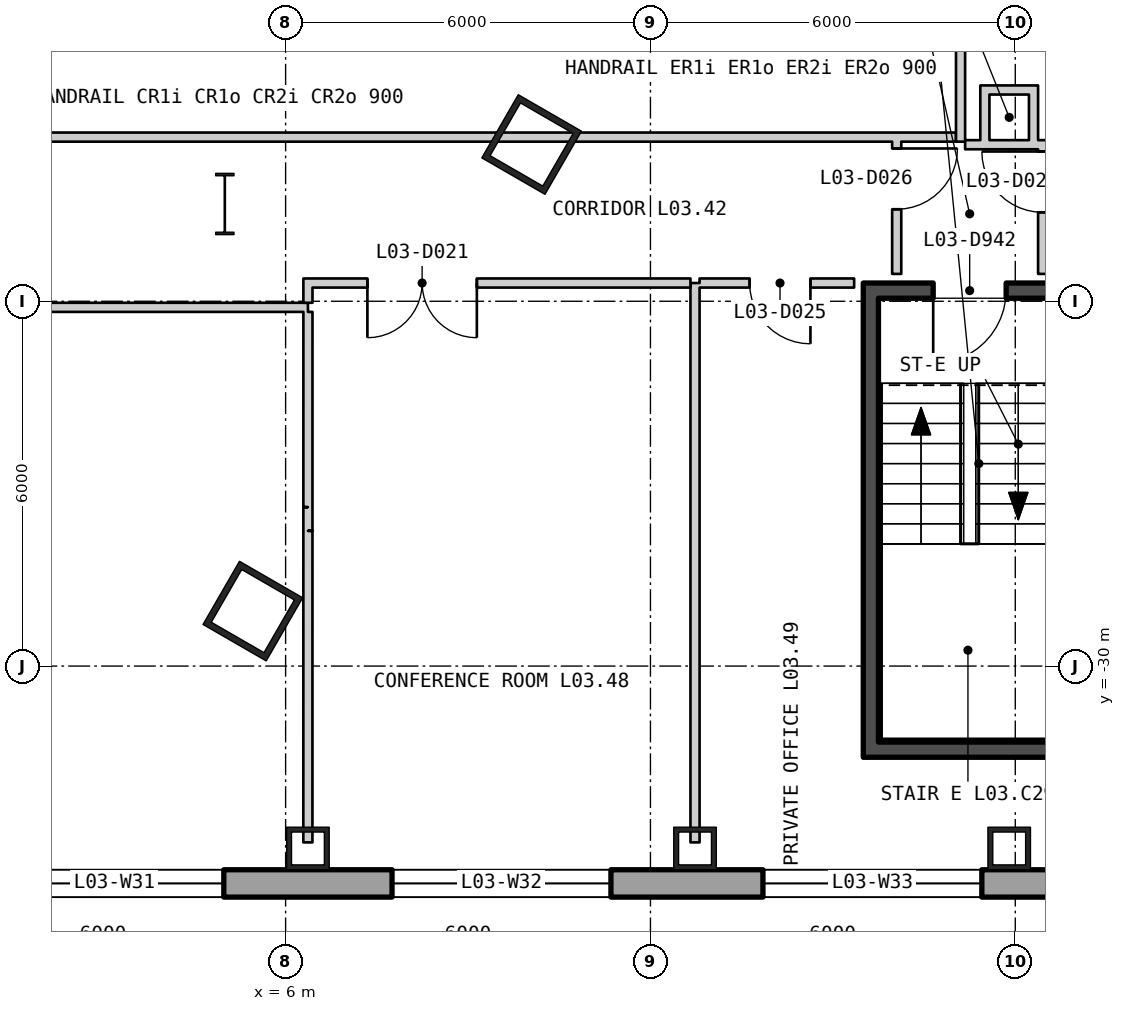
"""IFC4 building model, lengths in metres.
Left out: names, types, materials, properties, quantities, classifications, styles, units other than length and angle.
Written with IfcOpenShell. Run it as: python <this file> out.ifc"""

import sys

from ifc_helpers import new_model, si_unit, direction, frame, frame_2d, origin, origin_2d, place, context, subcontext, project, spatial, polyline, rectangle, hollow_rectangle, i_section, outline, extrude, element, fill, save


model = new_model("IFC4")
c1 = context("Model", 3, precision=1e-05, world=origin(), true_north=direction((0.0, 1.0)))
c2 = subcontext(c1, "Body", "Model", "MODEL_VIEW")
j1 = project(units=[si_unit("LENGTHUNIT", "METRE"), si_unit("PLANEANGLEUNIT", "RADIAN")], contexts=[c1])
p1 = place(None, origin())
s1 = spatial("IfcSite", under=j1, at=p1, CompositionType="ELEMENT")
p2 = place(p1, origin())
s2 = spatial("IfcBuilding", under=s1, at=p2, CompositionType="ELEMENT")
p3 = place(p2, frame((0.0, 0.0, 18.6)))
s3 = spatial("IfcBuildingStorey", under=s2, at=p3, CompositionType="ELEMENT", Elevation=18.6)
for number, where, z_axis, x_axis in (
    (1, (5.461, -29.096, 0.0), (0.0, 0.0, 1.0), (0.5, 0.866, 0.0)),
    (2, (10.046, -21.422, 0.0), (0.0, 0.0, 1.0), (0.5, 0.866, 0.0)),
):
    element("IfcColumn", number, at=place(p3, frame(where, z_axis=z_axis, x_axis=x_axis)), inside=s3, PredefinedType="COLUMN", context=c2, shape_type="SweptSolid", body=[
        extrude(hollow_rectangle(XDim=1.2, YDim=1.2, WallThickness=0.1, at=origin_2d()), origin(), (0.0, 0.0, 1.0), 5.1),
    ])
p4 = place(p3, frame((5.0, -22.4, 0.0), z_axis=(0.0, 0.0, 1.0), x_axis=(1.0, 0.0, 0.0)))
e3 = element("IfcColumn", 3, at=p4, inside=s3, PredefinedType="COLUMN", context=c2, shape_type="SweptSolid", body=[
    extrude(i_section(OverallWidth=0.302, OverallDepth=1.008, WebThickness=0.021, FlangeThickness=0.04, at=origin_2d()), origin(), (0.0, 0.0, 1.0), 5.1),
])
for number, where, z_axis, x_axis in (
    (4, (6.367, -33.0, 0.0), (0.0, 0.0, 1.0), (1.0, 0.0, 0.0)),
    (5, (12.733, -33.0, 0.0), (0.0, 0.0, 1.0), (1.0, 0.0, 0.0)),
    (6, (17.9, -33.0, 0.0), (0.0, 0.0, 1.0), (1.0, 0.0, 0.0)),
):
    element("IfcColumn", number, at=place(p3, frame(where, z_axis=z_axis, x_axis=x_axis)), inside=s3, PredefinedType="COLUMN", context=c2, shape_type="SweptSolid", body=[
        extrude(hollow_rectangle(XDim=0.7, YDim=0.7, WallThickness=0.08, at=origin_2d()), origin(), (0.0, 0.0, 1.0), 5.1),
    ])
p5 = place(p3, frame((-38.775, -33.575, -0.4), z_axis=(0.0, 0.0, 1.0), x_axis=(1.0, 0.0, 0.0)))
e7 = element("IfcWall", 7, at=p5, inside=s3, PredefinedType="SOLIDWALL", context=c2, shape_type="SweptSolid", body=[
    extrude(outline(polyline([(-0.225, -0.225), (77.775, -0.225), (77.325, 0.225), (0.225, 0.225), (-0.225, -0.225)])), origin(), (0.0, 0.0, 1.0), 5.1),
])
p6 = place(p5, frame((1.958, 0.0, 1.3)))
e8 = element("IfcOpeningElement", 8, at=p6, cuts=e7, PredefinedType="OPENING", context=c2, shape_type="SweptSolid", body=[
    extrude(rectangle(XDim=3.6, YDim=3.2, at=frame_2d((1.8, 1.6))), frame((0.0, 0.235, 0.0), z_axis=(0.0, -1.0, 0.0), x_axis=(1.0, 0.0, 0.0)), (0.0, 0.0, 1.0), 0.47),
])
p7 = place(p5, frame((8.325, 0.0, 1.3)))
e9 = element("IfcOpeningElement", 9, at=p7, cuts=e7, PredefinedType="OPENING", context=c2, shape_type="SweptSolid", body=[
    extrude(rectangle(XDim=3.6, YDim=3.2, at=frame_2d((1.8, 1.6))), frame((0.0, 0.235, 0.0), z_axis=(0.0, -1.0, 0.0), x_axis=(1.0, 0.0, 0.0)), (0.0, 0.0, 1.0), 0.47),
])
p8 = place(p5, frame((14.692, 0.0, 1.3)))
e10 = element("IfcOpeningElement", 10, at=p8, cuts=e7, PredefinedType="OPENING", context=c2, shape_type="SweptSolid", body=[
    extrude(rectangle(XDim=3.6, YDim=3.2, at=frame_2d((1.8, 1.6))), frame((0.0, 0.235, 0.0), z_axis=(0.0, -1.0, 0.0), x_axis=(1.0, 0.0, 0.0)), (0.0, 0.0, 1.0), 0.47),
])
p9 = place(p5, frame((21.325, 0.0, 1.3)))
e11 = element("IfcOpeningElement", 11, at=p9, cuts=e7, PredefinedType="OPENING", context=c2, shape_type="SweptSolid", body=[
    extrude(rectangle(XDim=3.6, YDim=3.2, at=frame_2d((1.8, 1.6))), frame((0.0, 0.235, 0.0), z_axis=(0.0, -1.0, 0.0), x_axis=(1.0, 0.0, 0.0)), (0.0, 0.0, 1.0), 0.47),
])
p10 = place(p5, frame((27.425, 0.0, 1.3)))
e12 = element("IfcOpeningElement", 12, at=p10, cuts=e7, PredefinedType="OPENING", context=c2, shape_type="SweptSolid", body=[
    extrude(rectangle(XDim=3.6, YDim=3.2, at=frame_2d((1.8, 1.6))), frame((0.0, 0.235, 0.0), z_axis=(0.0, -1.0, 0.0), x_axis=(1.0, 0.0, 0.0)), (0.0, 0.0, 1.0), 0.47),
])
p11 = place(p5, frame((33.792, 0.0, 1.3)))
e13 = element("IfcOpeningElement", 13, at=p11, cuts=e7, PredefinedType="OPENING", context=c2, shape_type="SweptSolid", body=[
    extrude(rectangle(XDim=3.6, YDim=3.2, at=frame_2d((1.8, 1.6))), frame((0.0, 0.235, 0.0), z_axis=(0.0, -1.0, 0.0), x_axis=(1.0, 0.0, 0.0)), (0.0, 0.0, 1.0), 0.47),
])
p12 = place(p5, frame((40.158, 0.0, 1.3)))
e14 = element("IfcOpeningElement", 14, at=p12, cuts=e7, PredefinedType="OPENING", context=c2, shape_type="SweptSolid", body=[
    extrude(rectangle(XDim=3.6, YDim=3.2, at=frame_2d((1.8, 1.6))), frame((0.0, 0.235, 0.0), z_axis=(0.0, -1.0, 0.0), x_axis=(1.0, 0.0, 0.0)), (0.0, 0.0, 1.0), 0.47),
])
p13 = place(p5, frame((46.525, 0.0, 1.3)))
e15 = element("IfcOpeningElement", 15, at=p13, cuts=e7, PredefinedType="OPENING", context=c2, shape_type="SweptSolid", body=[
    extrude(rectangle(XDim=3.6, YDim=3.2, at=frame_2d((1.8, 1.6))), frame((0.0, 0.235, 0.0), z_axis=(0.0, -1.0, 0.0), x_axis=(1.0, 0.0, 0.0)), (0.0, 0.0, 1.0), 0.47),
])
p14 = place(p5, frame((52.625, 0.0, 1.3)))
e16 = element("IfcOpeningElement", 16, at=p14, cuts=e7, PredefinedType="OPENING", context=c2, shape_type="SweptSolid", body=[
    extrude(rectangle(XDim=3.6, YDim=3.2, at=frame_2d((1.8, 1.6))), frame((0.0, 0.235, 0.0), z_axis=(0.0, -1.0, 0.0), x_axis=(1.0, 0.0, 0.0)), (0.0, 0.0, 1.0), 0.47),
])
p15 = place(p5, frame((59.258, 0.0, 1.3)))
e17 = element("IfcOpeningElement", 17, at=p15, cuts=e7, PredefinedType="OPENING", context=c2, shape_type="SweptSolid", body=[
    extrude(rectangle(XDim=3.6, YDim=3.2, at=frame_2d((1.8, 1.6))), frame((0.0, 0.235, 0.0), z_axis=(0.0, -1.0, 0.0), x_axis=(1.0, 0.0, 0.0)), (0.0, 0.0, 1.0), 0.47),
])
p16 = place(p5, frame((65.625, 0.0, 1.3)))
e18 = element("IfcOpeningElement", 18, at=p16, cuts=e7, PredefinedType="OPENING", context=c2, shape_type="SweptSolid", body=[
    extrude(rectangle(XDim=3.6, YDim=3.2, at=frame_2d((1.8, 1.6))), frame((0.0, 0.235, 0.0), z_axis=(0.0, -1.0, 0.0), x_axis=(1.0, 0.0, 0.0)), (0.0, 0.0, 1.0), 0.47),
])
p17 = place(p5, frame((71.992, 0.0, 1.3)))
e19 = element("IfcOpeningElement", 19, at=p17, cuts=e7, PredefinedType="OPENING", context=c2, shape_type="SweptSolid", body=[
    extrude(rectangle(XDim=3.6, YDim=3.2, at=frame_2d((1.8, 1.6))), frame((0.0, 0.235, 0.0), z_axis=(0.0, -1.0, 0.0), x_axis=(1.0, 0.0, 0.0)), (0.0, 0.0, 1.0), 0.47),
])
p18 = place(p3, frame((15.625, -31.25, 0.0), z_axis=(0.0, 0.0, 1.0), x_axis=(0.0, 1.0, 0.0)))
e20 = element("IfcWall", 20, at=p18, inside=s3, PredefinedType="SHEAR", context=c2, shape_type="SweptSolid", body=[
    extrude(rectangle(XDim=7.3, YDim=0.25, at=frame_2d((3.65, 0.0))), origin(), (0.0, 0.0, 1.0), 4.88),
])
p19 = place(p3, frame((15.5, -31.375, 0.0), z_axis=(0.0, 0.0, 1.0), x_axis=(1.0, 0.0, 0.0)))
e21 = element("IfcWall", 21, at=p19, inside=s3, PredefinedType="SHEAR", context=c2, shape_type="SweptSolid", body=[
    extrude(rectangle(XDim=3.5, YDim=0.25, at=frame_2d((1.75, 0.0))), origin(), (0.0, 0.0, 1.0), 4.88),
])
p20 = place(p3, frame((15.5, -23.825, 0.0), z_axis=(0.0, 0.0, 1.0), x_axis=(1.0, 0.0, 0.0)))
e22 = element("IfcWall", 22, at=p20, inside=s3, PredefinedType="SHEAR", context=c2, shape_type="SweptSolid", body=[
    extrude(rectangle(XDim=3.5, YDim=0.25, at=frame_2d((1.75, 0.0))), origin(), (0.0, 0.0, 1.0), 4.88),
])
p21 = place(p20, frame((1.15, 0.0, 0.0)))
e23 = element("IfcOpeningElement", 23, at=p21, cuts=e22, PredefinedType="OPENING", context=c2, shape_type="SweptSolid", body=[
    extrude(rectangle(XDim=1.2, YDim=2.1, at=frame_2d((0.6, 1.05))), frame((0.0, 0.135, 0.0), z_axis=(0.0, -1.0, 0.0), x_axis=(1.0, 0.0, 0.0)), (0.0, 0.0, 1.0), 0.27),
])
p22 = place(p3, frame((-12.733, -24.1, 0.0), z_axis=(0.0, 0.0, 1.0), x_axis=(1.0, 0.0, 0.0)))
e24 = element("IfcWall", 24, at=p22, inside=s3, PredefinedType="PARTITIONING", context=c2, shape_type="SweptSolid", body=[
    extrude(rectangle(XDim=19.1, YDim=0.15, at=frame_2d((9.55, 0.0))), origin(), (0.0, 0.0, 1.0), 4.88),
])
p23 = place(p22, frame((8.807, 0.0, 0.0)))
e25 = element("IfcOpeningElement", 25, at=p23, cuts=e24, PredefinedType="OPENING", context=c2, shape_type="SweptSolid", body=[
    extrude(rectangle(XDim=1.0, YDim=2.1, at=frame_2d((0.5, 1.05))), frame((0.0, 0.085, 0.0), z_axis=(0.0, -1.0, 0.0), x_axis=(1.0, 0.0, 0.0)), (0.0, 0.0, 1.0), 0.17),
])
p24 = place(p3, frame((1.7, -21.3, 0.0), z_axis=(0.0, 0.0, 1.0), x_axis=(1.0, 0.0, 0.0)))
e26 = element("IfcWall", 26, at=p24, inside=s3, PredefinedType="PARTITIONING", context=c2, shape_type="SweptSolid", body=[
    extrude(rectangle(XDim=15.325, YDim=0.15, at=frame_2d((7.662, 0.0))), origin(), (0.0, 0.0, 1.0), 4.88),
])
p25 = place(p3, frame((6.366, -32.9, 0.0), z_axis=(0.0, 0.0, 1.0), x_axis=(0.000117096018, 0.999999993144, 0.0)))
e27 = element("IfcWall", 27, at=p25, inside=s3, PredefinedType="PARTITIONING", context=c2, shape_type="SweptSolid", body=[
    extrude(rectangle(XDim=5.124, YDim=0.15, at=frame_2d((2.562, 0.0))), origin(), (0.0, 0.0, 1.0), 4.28),
])
p26 = place(p3, frame((6.367, -27.776, 0.0), z_axis=(0.0, 0.0, 1.0), x_axis=(0.0, 1.0, 0.0)))
e28 = element("IfcWall", 28, at=p26, inside=s3, PredefinedType="PARTITIONING", context=c2, shape_type="SweptSolid", body=[
    extrude(rectangle(XDim=0.39, YDim=0.15, at=frame_2d((0.195, 0.0))), origin(), (0.0, 0.0, 1.0), 4.88),
])
p27 = place(p3, frame((6.367, -27.386, 0.0), z_axis=(0.0, 0.0, 1.0), x_axis=(0.000124571784, 0.999999992241, 0.0)))
e29 = element("IfcWall", 29, at=p27, inside=s3, PredefinedType="PARTITIONING", context=c2, shape_type="SweptSolid", body=[
    extrude(rectangle(XDim=3.211, YDim=0.15, at=frame_2d((1.605, 0.0))), origin(), (0.0, 0.0, 1.0), 4.28),
])
p28 = place(p3, frame((6.367, -24.025, 0.0), z_axis=(0.0, 0.0, 1.0), x_axis=(0.0, 1.0, 0.0)))
e30 = element("IfcWall", 30, at=p28, inside=s3, PredefinedType="PARTITIONING", context=c2, shape_type="SweptSolid", body=[
    extrude(rectangle(XDim=0.4, YDim=0.15, at=frame_2d((0.2, 0.0))), origin(), (0.0, 0.0, 1.0), 4.88),
])
p29 = place(p3, frame((6.442, -23.7, 0.0), z_axis=(0.0, 0.0, 1.0), x_axis=(1.0, 0.0, 0.0)))
e31 = element("IfcWall", 31, at=p29, inside=s3, PredefinedType="PARTITIONING", context=c2, shape_type="SweptSolid", body=[
    extrude(rectangle(XDim=6.216, YDim=0.15, at=frame_2d((3.108, 0.0))), origin(), (0.0, 0.0, 1.0), 4.88),
])
p30 = place(p29, frame((0.903, 0.0, 0.0)))
e32 = element("IfcOpeningElement", 32, at=p30, cuts=e31, PredefinedType="OPENING", context=c2, shape_type="SweptSolid", body=[
    extrude(rectangle(XDim=1.8, YDim=2.1, at=frame_2d((0.9, 1.05))), frame((0.0, 0.085, 0.0), z_axis=(0.0, -1.0, 0.0), x_axis=(1.0, 0.0, 0.0)), (0.0, 0.0, 1.0), 0.17),
])
p31 = place(p3, frame((12.733, -32.9, 0.0), z_axis=(0.0, 0.0, 1.0), x_axis=(0.0, 1.0, 0.0)))
e33 = element("IfcWall", 33, at=p31, inside=s3, PredefinedType="PARTITIONING", context=c2, shape_type="SweptSolid", body=[
    extrude(rectangle(XDim=9.2, YDim=0.15, at=frame_2d((4.6, 0.0))), origin(), (0.0, 0.0, 1.0), 4.19),
])
p32 = place(p3, frame((12.808, -23.7, 0.0), z_axis=(0.0, 0.0, 1.0), x_axis=(1.0, 0.0, 0.0)))
e34 = element("IfcWall", 34, at=p32, inside=s3, PredefinedType="PARTITIONING", context=c2, shape_type="SweptSolid", body=[
    extrude(rectangle(XDim=2.542, YDim=0.15, at=frame_2d((1.271, 0.0))), origin(), (0.0, 0.0, 1.0), 4.88),
])
p33 = place(p32, frame((0.823, 0.0, 0.0)))
e35 = element("IfcOpeningElement", 35, at=p33, cuts=e34, PredefinedType="OPENING", context=c2, shape_type="SweptSolid", body=[
    extrude(rectangle(XDim=1.0, YDim=2.1, at=frame_2d((0.5, 1.05))), frame((0.0, 0.085, 0.0), z_axis=(0.0, -1.0, 0.0), x_axis=(1.0, 0.0, 0.0)), (0.0, 0.0, 1.0), 0.17),
])
p34 = place(p3, frame((16.05, -23.55, 0.0), z_axis=(0.0, 0.0, 1.0), x_axis=(0.0, 1.0, 0.0)))
e36 = element("IfcWall", 36, at=p34, inside=s3, PredefinedType="PARTITIONING", context=c2, shape_type="SweptSolid", body=[
    extrude(rectangle(XDim=2.175, YDim=0.15, at=frame_2d((1.087, 0.0))), origin(), (0.0, 0.0, 1.0), 4.88),
])
p35 = place(p34, frame((1.063, 0.0, 0.0)))
e37 = element("IfcOpeningElement", 37, at=p35, cuts=e36, PredefinedType="OPENING", context=c2, shape_type="SweptSolid", body=[
    extrude(rectangle(XDim=1.0, YDim=2.1, at=frame_2d((0.5, 1.05))), frame((0.0, 0.085, 0.0), z_axis=(0.0, -1.0, 0.0), x_axis=(1.0, 0.0, 0.0)), (0.0, 0.0, 1.0), 0.17),
])
p36 = place(p3, frame((17.1, -21.375, 0.0), z_axis=(0.0, 0.0, 1.0), x_axis=(0.0, 1.0, 0.0)))
e38 = element("IfcWall", 38, at=p36, inside=s3, PredefinedType="PARTITIONING", context=c2, shape_type="SweptSolid", body=[
    extrude(rectangle(XDim=19.05, YDim=0.15, at=frame_2d((9.525, 0.0))), origin(), (0.0, 0.0, 1.0), 4.88),
])
p37 = place(p3, frame((17.175, -21.425, 0.0), z_axis=(0.0, 0.0, 1.0), x_axis=(1.0, 0.0, 0.0)))
e39 = element("IfcWall", 39, at=p37, inside=s3, PredefinedType="PARTITIONING", context=c2, shape_type="SweptSolid", body=[
    extrude(rectangle(XDim=0.25, YDim=0.15, at=frame_2d((0.125, 0.0))), origin(), (0.0, 0.0, 1.0), 4.88),
])
p38 = place(p3, frame((17.5, -21.5, 0.0), z_axis=(0.0, 0.0, 1.0), x_axis=(0.0, 1.0, 0.0)))
e40 = element("IfcWall", 40, at=p38, inside=s3, PredefinedType="PARTITIONING", context=c2, shape_type="SweptSolid", body=[
    extrude(rectangle(XDim=1.05, YDim=0.15, at=frame_2d((0.525, 0.0))), origin(), (0.0, 0.0, 1.0), 4.88),
])
for number, where, z_axis, x_axis in (
    (41, (17.575, -21.425, 0.0), (0.0, 0.0, 1.0), (1.0, 0.0, 0.0)),
    (42, (17.575, -20.525, 0.0), (0.0, 0.0, 1.0), (1.0, 0.0, 0.0)),
):
    element("IfcWall", number, at=place(p3, frame(where, z_axis=z_axis, x_axis=x_axis)), inside=s3, PredefinedType="PARTITIONING", context=c2, shape_type="SweptSolid", body=[
        extrude(rectangle(XDim=0.65, YDim=0.15, at=frame_2d((0.325, 0.0))), origin(), (0.0, 0.0, 1.0), 4.88),
    ])
p39 = place(p3, frame((18.3, -21.5, 0.0), z_axis=(0.0, 0.0, 1.0), x_axis=(0.0, 1.0, 0.0)))
e43 = element("IfcWall", 43, at=p39, inside=s3, PredefinedType="PARTITIONING", context=c2, shape_type="SweptSolid", body=[
    extrude(rectangle(XDim=1.05, YDim=0.15, at=frame_2d((0.525, 0.0))), origin(), (0.0, 0.0, 1.0), 4.88),
])
p40 = place(p3, frame((18.45, -23.55, 0.0), z_axis=(0.0, 0.0, 1.0), x_axis=(0.0, 1.0, 0.0)))
e44 = element("IfcWall", 44, at=p40, inside=s3, PredefinedType="PARTITIONING", context=c2, shape_type="SweptSolid", body=[
    extrude(rectangle(XDim=2.2, YDim=0.15, at=frame_2d((1.1, 0.0))), origin(), (0.0, 0.0, 1.0), 4.88),
])
p41 = place(p40, frame((1.013, 0.0, 0.0)))
e45 = element("IfcOpeningElement", 45, at=p41, cuts=e44, PredefinedType="OPENING", context=c2, shape_type="SweptSolid", body=[
    extrude(rectangle(XDim=1.0, YDim=2.1, at=frame_2d((0.5, 1.05))), frame((0.0, 0.085, 0.0), z_axis=(0.0, -1.0, 0.0), x_axis=(1.0, 0.0, 0.0)), (0.0, 0.0, 1.0), 0.17),
])
p42 = place(p12, origin())
e46 = element("IfcWindow", 46, at=p42, inside=s3, PartitioningType="SINGLE_PANEL", PredefinedType="WINDOW", context=c2, shape_type="SweptSolid", body=[
    extrude(rectangle(XDim=3.6, YDim=3.2, at=frame_2d((1.8, 1.6))), frame((0.0, 0.105, 0.0), z_axis=(0.0, -1.0, 0.0), x_axis=(1.0, 0.0, 0.0)), (0.0, 0.0, 1.0), 0.06),
])
fill(e14, e46)
p43 = place(p13, origin())
e47 = element("IfcWindow", 47, at=p43, inside=s3, PartitioningType="SINGLE_PANEL", PredefinedType="WINDOW", context=c2, shape_type="SweptSolid", body=[
    extrude(rectangle(XDim=3.6, YDim=3.2, at=frame_2d((1.8, 1.6))), frame((0.0, 0.105, 0.0), z_axis=(0.0, -1.0, 0.0), x_axis=(1.0, 0.0, 0.0)), (0.0, 0.0, 1.0), 0.06),
])
fill(e15, e47)
p44 = place(p14, origin())
e48 = element("IfcWindow", 48, at=p44, inside=s3, PartitioningType="SINGLE_PANEL", PredefinedType="WINDOW", context=c2, shape_type="SweptSolid", body=[
    extrude(rectangle(XDim=3.6, YDim=3.2, at=frame_2d((1.8, 1.6))), frame((0.0, 0.105, 0.0), z_axis=(0.0, -1.0, 0.0), x_axis=(1.0, 0.0, 0.0)), (0.0, 0.0, 1.0), 0.06),
])
fill(e16, e48)
p45 = place(p21, origin())
e49 = element("IfcDoor", 49, at=p45, inside=s3, OperationType="SINGLE_SWING_LEFT", PredefinedType="DOOR", context=c2, shape_type="SweptSolid", body=[
    extrude(rectangle(XDim=1.2, YDim=2.1, at=frame_2d((0.6, 1.05))), frame((0.0, 0.025, 0.0), z_axis=(0.0, -1.0, 0.0), x_axis=(1.0, 0.0, 0.0)), (0.0, 0.0, 1.0), 0.05),
])
fill(e23, e49)
p46 = place(p30, origin())
e50 = element("IfcDoor", 50, at=p46, inside=s3, OperationType="DOUBLE_DOOR_SINGLE_SWING", PredefinedType="DOOR", context=c2, shape_type="SweptSolid", body=[
    extrude(rectangle(XDim=1.8, YDim=2.1, at=frame_2d((0.9, 1.05))), frame((0.0, 0.025, 0.0), z_axis=(0.0, -1.0, 0.0), x_axis=(1.0, 0.0, 0.0)), (0.0, 0.0, 1.0), 0.05),
])
fill(e32, e50)
p47 = place(p33, origin())
e51 = element("IfcDoor", 51, at=p47, inside=s3, OperationType="SINGLE_SWING_RIGHT", PredefinedType="DOOR", context=c2, shape_type="SweptSolid", body=[
    extrude(rectangle(XDim=1.0, YDim=2.1, at=frame_2d((0.5, 1.05))), frame((0.0, 0.025, 0.0), z_axis=(0.0, -1.0, 0.0), x_axis=(1.0, 0.0, 0.0)), (0.0, 0.0, 1.0), 0.05),
])
fill(e35, e51)
p48 = place(p35, origin())
e52 = element("IfcDoor", 52, at=p48, inside=s3, OperationType="SINGLE_SWING_RIGHT", PredefinedType="DOOR", context=c2, shape_type="SweptSolid", body=[
    extrude(rectangle(XDim=1.0, YDim=2.1, at=frame_2d((0.5, 1.05))), frame((0.0, 0.025, 0.0), z_axis=(0.0, -1.0, 0.0), x_axis=(1.0, 0.0, 0.0)), (0.0, 0.0, 1.0), 0.05),
])
fill(e37, e52)
p49 = place(p41, origin())
e53 = element("IfcDoor", 53, at=p49, inside=s3, OperationType="SINGLE_SWING_LEFT", PredefinedType="DOOR", context=c2, shape_type="SweptSolid", body=[
    extrude(rectangle(XDim=1.0, YDim=2.1, at=frame_2d((0.5, 1.05))), frame((0.0, 0.025, 0.0), z_axis=(0.0, -1.0, 0.0), x_axis=(1.0, 0.0, 0.0)), (0.0, 0.0, 1.0), 0.05),
])
fill(e45, e53)
save(model, sys.argv[1])
